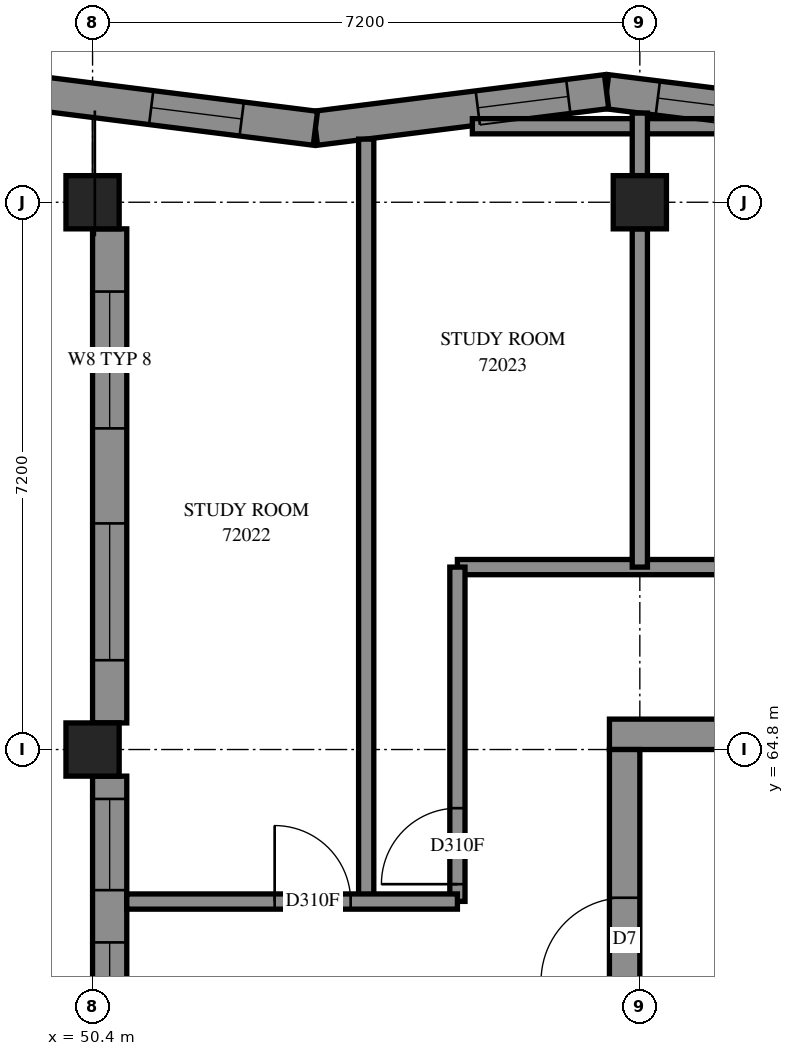
"""IFC4 building model, lengths in metres.
Left out: names, types, materials, properties, quantities, classifications, styles, units other than length and angle.
Written with IfcOpenShell. Run it as: python <this file> out.ifc"""

import sys

from ifc_helpers import new_model, si_unit, direction, frame, frame_2d, origin, origin_2d, place, context, subcontext, project, spatial, polyline, rectangle, outline, extrude, element, fill, save


model = new_model("IFC4")
c1 = context("Model", 3, precision=1e-05, world=origin(), true_north=direction((0.0, 1.0)))
c2 = subcontext(c1, "Body", "Model", "MODEL_VIEW")
j1 = project(units=[si_unit("LENGTHUNIT", "METRE"), si_unit("PLANEANGLEUNIT", "RADIAN")], contexts=[c1])
p1 = place(None, origin())
s1 = spatial("IfcSite", under=j1, at=p1, CompositionType="ELEMENT")
p2 = place(p1, origin())
s2 = spatial("IfcBuilding", under=s1, at=p2, CompositionType="ELEMENT")
p3 = place(p2, frame((0.0, 0.0, 264.2)))
s3 = spatial("IfcBuildingStorey", under=s2, at=p3, CompositionType="ELEMENT", Elevation=264.2)
for number, where, z_axis, x_axis in (
    (1, (50.4, 64.8, 0.0), (0.0, 0.0, 1.0), (1.0, 0.0, 0.0)),
    (2, (50.4, 72.0, 0.0), (0.0, 0.0, 1.0), (1.0, 0.0, 0.0)),
    (3, (57.6, 72.0, 0.0), (0.0, 0.0, 1.0), (1.0, 0.0, 0.0)),
):
    element("IfcColumn", number, at=place(p3, frame(where, z_axis=z_axis, x_axis=x_axis)), inside=s3, PredefinedType="COLUMN", context=c2, shape_type="SweptSolid", body=[
        extrude(rectangle(XDim=0.7, YDim=0.7, at=origin_2d()), origin(), (0.0, 0.0, 1.0), 3.1),
    ])
p4 = place(p3, frame((57.2, 65.0, -0.3), z_axis=(0.0, 0.0, 1.0), x_axis=(1.0, 0.0, 0.0)))
e4 = element("IfcWall", 4, at=p4, inside=s3, PredefinedType="SHEAR", context=c2, shape_type="SweptSolid", body=[
    extrude(rectangle(XDim=15.2, YDim=0.4, at=frame_2d((7.6, 0.0))), origin(), (0.0, 0.0, 1.0), 2.7),
])
p5 = place(p4, frame((10.4, 0.0, 0.3)))
e5 = element("IfcOpeningElement", 5, at=p5, cuts=e4, PredefinedType="OPENING", context=c2, shape_type="SweptSolid", body=[
    extrude(rectangle(XDim=0.8, YDim=2.1, at=frame_2d((0.4, 1.05))), frame((0.0, 0.21, 0.0), z_axis=(0.0, -1.0, 0.0), x_axis=(1.0, 0.0, 0.0)), (0.0, 0.0, 1.0), 0.42),
])
p6 = place(p3, frame((57.4, 50.4, -0.3), z_axis=(0.0, 0.0, 1.0), x_axis=(0.0, 1.0, 0.0)))
e6 = element("IfcWall", 6, at=p6, inside=s3, PredefinedType="SHEAR", context=c2, shape_type="SweptSolid", body=[
    extrude(rectangle(XDim=14.4, YDim=0.4, at=frame_2d((7.2, 0.0))), origin(), (0.0, 0.0, 1.0), 2.7),
])
p7 = place(p6, frame((4.55, 0.0, 0.3)))
e7 = element("IfcOpeningElement", 7, at=p7, cuts=e6, PredefinedType="OPENING", context=c2, shape_type="SweptSolid", body=[
    extrude(rectangle(XDim=1.1, YDim=2.1, at=frame_2d((0.55, 1.05))), frame((0.0, 0.21, 0.0), z_axis=(0.0, -1.0, 0.0), x_axis=(1.0, 0.0, 0.0)), (0.0, 0.0, 1.0), 0.42),
])
p8 = place(p6, frame((11.35, 0.0, 0.3)))
e8 = element("IfcOpeningElement", 8, at=p8, cuts=e6, PredefinedType="OPENING", context=c2, shape_type="SweptSolid", body=[
    extrude(rectangle(XDim=1.1, YDim=2.1, at=frame_2d((0.55, 1.05))), frame((0.0, 0.21, 0.0), z_axis=(0.0, -1.0, 0.0), x_axis=(1.0, 0.0, 0.0)), (0.0, 0.0, 1.0), 0.42),
])
p9 = place(p3, frame((60.993, 72.973, 0.0), z_axis=(0.0, 0.0, 1.0), x_axis=(-0.9921759282, 0.1248476171, 0.0)))
e9 = element("IfcWall", 9, at=p9, inside=s3, PredefinedType="SOLIDWALL", context=c2, shape_type="SweptSolid", body=[
    extrude(outline(polyline([(0.028, -0.225), (3.889, -0.225), (3.832, 0.225), (-0.028, 0.225), (0.028, -0.225)])), origin(), (0.0, 0.0, 1.0), 3.1),
])
p10 = place(p9, frame((0.531, 0.0, 0.45)))
e10 = element("IfcOpeningElement", 10, at=p10, cuts=e9, PredefinedType="OPENING", context=c2, shape_type="SweptSolid", body=[
    extrude(rectangle(XDim=1.3, YDim=2.5, at=frame_2d((0.65, 1.25))), frame((0.0, 0.235, 0.0), z_axis=(0.0, -1.0, 0.0), x_axis=(1.0, 0.0, 0.0)), (0.0, 0.0, 1.0), 0.47),
])
p11 = place(p9, frame((2.181, 0.0, 0.45)))
e11 = element("IfcOpeningElement", 11, at=p11, cuts=e9, PredefinedType="OPENING", context=c2, shape_type="SweptSolid", body=[
    extrude(rectangle(XDim=1.0, YDim=2.5, at=frame_2d((0.5, 1.25))), frame((0.0, 0.235, 0.0), z_axis=(0.0, -1.0, 0.0), x_axis=(1.0, 0.0, 0.0)), (0.0, 0.0, 1.0), 0.47),
])
p12 = place(p3, frame((57.162, 73.455, 0.0), z_axis=(0.0, 0.0, 1.0), x_axis=(-0.9921763319, -0.1248444087, 0.0)))
e12 = element("IfcWall", 12, at=p12, inside=s3, PredefinedType="SOLIDWALL", context=c2, shape_type="SweptSolid", body=[
    extrude(outline(polyline([(-0.028, -0.225), (3.832, -0.225), (3.889, 0.225), (0.028, 0.225), (-0.028, -0.225)])), origin(), (0.0, 0.0, 1.0), 3.1),
])
p13 = place(p12, frame((0.508, 0.0, 0.45)))
e13 = element("IfcOpeningElement", 13, at=p13, cuts=e12, PredefinedType="OPENING", context=c2, shape_type="SweptSolid", body=[
    extrude(rectangle(XDim=1.2, YDim=2.55, at=frame_2d((0.6, 1.275))), frame((0.0, 0.235, 0.0), z_axis=(0.0, -1.0, 0.0), x_axis=(1.0, 0.0, 0.0)), (0.0, 0.0, 1.0), 0.47),
])
p14 = place(p3, frame((53.332, 72.973, 0.0), z_axis=(0.0, 0.0, 1.0), x_axis=(-0.9921759282, 0.1248476171, 0.0)))
e14 = element("IfcWall", 14, at=p14, inside=s3, PredefinedType="SOLIDWALL", context=c2, shape_type="SweptSolid", body=[
    extrude(outline(polyline([(0.028, -0.225), (3.889, -0.225), (3.832, 0.225), (-0.028, 0.225), (0.028, -0.225)])), origin(), (0.0, 0.0, 1.0), 3.1),
])
p15 = place(p14, frame((0.977, 0.0, 0.45)))
e15 = element("IfcOpeningElement", 15, at=p15, cuts=e14, PredefinedType="OPENING", context=c2, shape_type="SweptSolid", body=[
    extrude(rectangle(XDim=1.2, YDim=2.55, at=frame_2d((0.6, 1.275))), frame((0.0, 0.235, 0.0), z_axis=(0.0, -1.0, 0.0), x_axis=(1.0, 0.0, 0.0)), (0.0, 0.0, 1.0), 0.47),
])
p16 = place(p3, frame((50.625, 71.65, 0.0), z_axis=(0.0, 0.0, 1.0), x_axis=(0.0, -1.0, 0.0)))
e16 = element("IfcWall", 16, at=p16, inside=s3, PredefinedType="SOLIDWALL", context=c2, shape_type="SweptSolid", body=[
    extrude(rectangle(XDim=6.5, YDim=0.45, at=frame_2d((3.25, 0.0))), origin(), (0.0, 0.0, 1.0), 3.1),
])
p17 = place(p16, frame((0.825, 0.0, 0.7)))
e17 = element("IfcOpeningElement", 17, at=p17, cuts=e16, PredefinedType="OPENING", context=c2, shape_type="SweptSolid", body=[
    extrude(rectangle(XDim=1.8, YDim=1.8, at=frame_2d((0.9, 0.9))), frame((0.0, 0.235, 0.0), z_axis=(0.0, -1.0, 0.0), x_axis=(1.0, 0.0, 0.0)), (0.0, 0.0, 1.0), 0.47),
])
p18 = place(p16, frame((3.875, 0.0, 0.7)))
e18 = element("IfcOpeningElement", 18, at=p18, cuts=e16, PredefinedType="OPENING", context=c2, shape_type="SweptSolid", body=[
    extrude(rectangle(XDim=1.8, YDim=1.8, at=frame_2d((0.9, 0.9))), frame((0.0, 0.235, 0.0), z_axis=(0.0, -1.0, 0.0), x_axis=(1.0, 0.0, 0.0)), (0.0, 0.0, 1.0), 0.47),
])
p19 = place(p3, frame((50.625, 64.45, 0.0), z_axis=(0.0, 0.0, 1.0), x_axis=(0.0, -1.0, 0.0)))
e19 = element("IfcWall", 19, at=p19, inside=s3, PredefinedType="SOLIDWALL", context=c2, shape_type="SweptSolid", body=[
    extrude(rectangle(XDim=6.5, YDim=0.45, at=frame_2d((3.25, 0.0))), origin(), (0.0, 0.0, 1.0), 3.1),
])
p20 = place(p19, frame((3.875, 0.0, 0.7)))
e20 = element("IfcOpeningElement", 20, at=p20, cuts=e19, PredefinedType="OPENING", context=c2, shape_type="SweptSolid", body=[
    extrude(rectangle(XDim=1.8, YDim=1.8, at=frame_2d((0.9, 0.9))), frame((0.0, 0.235, 0.0), z_axis=(0.0, -1.0, 0.0), x_axis=(1.0, 0.0, 0.0)), (0.0, 0.0, 1.0), 0.47),
])
p21 = place(p19, frame((0.3, 0.0, 0.6)))
e21 = element("IfcOpeningElement", 21, at=p21, cuts=e19, PredefinedType="OPENING", context=c2, shape_type="SweptSolid", body=[
    extrude(rectangle(XDim=1.2, YDim=1.9, at=frame_2d((0.6, 0.95))), frame((0.0, 0.235, 0.0), z_axis=(0.0, -1.0, 0.0), x_axis=(1.0, 0.0, 0.0)), (0.0, 0.0, 1.0), 0.47),
])
p22 = place(p19, frame((2.188, 0.0, 0.6)))
e22 = element("IfcOpeningElement", 22, at=p22, cuts=e19, PredefinedType="OPENING", context=c2, shape_type="SweptSolid", body=[
    extrude(rectangle(XDim=1.2, YDim=1.9, at=frame_2d((0.6, 0.95))), frame((0.0, 0.235, 0.0), z_axis=(0.0, -1.0, 0.0), x_axis=(1.0, 0.0, 0.0)), (0.0, 0.0, 1.0), 0.47),
])
p23 = place(p3, frame((55.2, 67.2, 0.0), z_axis=(0.0, 0.0, 1.0), x_axis=(1.0, 0.0, 0.0)))
e23 = element("IfcWall", 23, at=p23, inside=s3, PredefinedType="PARTITIONING", context=c2, shape_type="SweptSolid", body=[
    extrude(rectangle(XDim=19.2, YDim=0.2, at=frame_2d((9.6, 0.0))), origin(), (0.0, 0.0, 1.0), 3.1),
])
p24 = place(p23, frame((4.492, 0.0, 0.0)))
e24 = element("IfcOpeningElement", 24, at=p24, cuts=e23, PredefinedType="OPENING", context=c2, shape_type="SweptSolid", body=[
    extrude(rectangle(XDim=1.0, YDim=2.1, at=frame_2d((0.5, 1.05))), frame((0.0, 0.11, 0.0), z_axis=(0.0, -1.0, 0.0), x_axis=(1.0, 0.0, 0.0)), (0.0, 0.0, 1.0), 0.22),
])
p25 = place(p23, frame((6.567, 0.0, 0.0)))
e25 = element("IfcOpeningElement", 25, at=p25, cuts=e23, PredefinedType="OPENING", context=c2, shape_type="SweptSolid", body=[
    extrude(rectangle(XDim=1.0, YDim=2.1, at=frame_2d((0.5, 1.05))), frame((0.0, 0.11, 0.0), z_axis=(0.0, -1.0, 0.0), x_axis=(1.0, 0.0, 0.0)), (0.0, 0.0, 1.0), 0.22),
])
p26 = place(p23, frame((11.693, 0.0, 0.0)))
e26 = element("IfcOpeningElement", 26, at=p26, cuts=e23, PredefinedType="OPENING", context=c2, shape_type="SweptSolid", body=[
    extrude(rectangle(XDim=1.0, YDim=2.1, at=frame_2d((0.5, 1.05))), frame((0.0, 0.11, 0.0), z_axis=(0.0, -1.0, 0.0), x_axis=(1.0, 0.0, 0.0)), (0.0, 0.0, 1.0), 0.22),
])
p27 = place(p23, frame((13.88, 0.0, 0.0)))
e27 = element("IfcOpeningElement", 27, at=p27, cuts=e23, PredefinedType="OPENING", context=c2, shape_type="SweptSolid", body=[
    extrude(rectangle(XDim=1.0, YDim=2.1, at=frame_2d((0.5, 1.05))), frame((0.0, 0.11, 0.0), z_axis=(0.0, -1.0, 0.0), x_axis=(1.0, 0.0, 0.0)), (0.0, 0.0, 1.0), 0.22),
])
p28 = place(p3, frame((54.0, 62.8, 0.0), z_axis=(0.0, 0.0, 1.0), x_axis=(0.0, 1.0, 0.0)))
e28 = element("IfcWall", 28, at=p28, inside=s3, PredefinedType="PARTITIONING", context=c2, shape_type="SweptSolid", body=[
    extrude(rectangle(XDim=10.031, YDim=0.2, at=frame_2d((5.015, 0.0))), origin(), (0.0, 0.0, 1.0), 3.1),
])
p29 = place(p3, frame((57.6, 67.2, 0.0), z_axis=(0.0, 0.0, 1.0), x_axis=(0.0, 1.0, 0.0)))
e29 = element("IfcWall", 29, at=p29, inside=s3, PredefinedType="PARTITIONING", context=c2, shape_type="SweptSolid", body=[
    extrude(rectangle(XDim=4.45, YDim=0.2, at=frame_2d((2.225, 0.0))), origin(), (0.0, 0.0, 1.0), 3.1),
])
p30 = place(p3, frame((55.2, 62.802, 0.0), z_axis=(0.0, 0.0, 1.0), x_axis=(0.0, 1.0, 0.0)))
e30 = element("IfcWall", 30, at=p30, inside=s3, PredefinedType="PARTITIONING", context=c2, shape_type="SweptSolid", body=[
    extrude(rectangle(XDim=4.398, YDim=0.2, at=frame_2d((2.199, 0.0))), origin(), (0.0, 0.0, 1.0), 3.1),
])
p31 = place(p30, frame((0.227, 0.0, 0.0)))
e31 = element("IfcOpeningElement", 31, at=p31, cuts=e30, PredefinedType="OPENING", context=c2, shape_type="SweptSolid", body=[
    extrude(rectangle(XDim=1.0, YDim=2.1, at=frame_2d((0.5, 1.05))), frame((0.0, 0.11, 0.0), z_axis=(0.0, -1.0, 0.0), x_axis=(1.0, 0.0, 0.0)), (0.0, 0.0, 1.0), 0.22),
])
p32 = place(p3, frame((50.85, 62.8, 0.0), z_axis=(0.0, 0.0, 1.0), x_axis=(1.0, 0.0, 0.0)))
e32 = element("IfcWall", 32, at=p32, inside=s3, PredefinedType="PARTITIONING", context=c2, shape_type="SweptSolid", body=[
    extrude(rectangle(XDim=4.35, YDim=0.2, at=frame_2d((2.175, 0.0))), origin(), (0.0, 0.0, 1.0), 3.1),
])
p33 = place(p32, frame((1.946, 0.0, 0.0)))
e33 = element("IfcOpeningElement", 33, at=p33, cuts=e32, PredefinedType="OPENING", context=c2, shape_type="SweptSolid", body=[
    extrude(rectangle(XDim=1.0, YDim=2.1, at=frame_2d((0.5, 1.05))), frame((0.0, 0.11, 0.0), z_axis=(0.0, -1.0, 0.0), x_axis=(1.0, 0.0, 0.0)), (0.0, 0.0, 1.0), 0.22),
])
p34 = place(p3, frame((55.397, 73.0, 0.0), z_axis=(0.0, 0.0, 1.0), x_axis=(1.0, 0.0, 0.0)))
e34 = element("IfcWall", 34, at=p34, inside=s3, PredefinedType="PARTITIONING", context=c2, shape_type="SweptSolid", body=[
    extrude(rectangle(XDim=3.531, YDim=0.2, at=frame_2d((1.766, 0.0))), origin(), (0.0, 0.0, 1.0), 3.1),
])
p35 = place(p3, frame((57.6, 72.35, 0.0), z_axis=(0.0, 0.0, 1.0), x_axis=(0.0, 1.0, 0.0)))
e35 = element("IfcWall", 35, at=p35, inside=s3, PredefinedType="PARTITIONING", context=c2, shape_type="SweptSolid", body=[
    extrude(rectangle(XDim=0.823, YDim=0.2, at=frame_2d((0.412, 0.0))), origin(), (0.0, 0.0, 1.0), 3.1),
])
p36 = place(p13, origin())
e36 = element("IfcWindow", 36, at=p36, inside=s3, PartitioningType="SINGLE_PANEL", PredefinedType="WINDOW", context=c2, shape_type="SweptSolid", body=[
    extrude(rectangle(XDim=1.2, YDim=2.55, at=frame_2d((0.6, 1.275))), frame((0.0, 0.105, 0.0), z_axis=(0.0, -1.0, 0.0), x_axis=(1.0, 0.0, 0.0)), (0.0, 0.0, 1.0), 0.06),
])
fill(e13, e36)
p37 = place(p15, origin())
e37 = element("IfcWindow", 37, at=p37, inside=s3, PartitioningType="SINGLE_PANEL", PredefinedType="WINDOW", context=c2, shape_type="SweptSolid", body=[
    extrude(rectangle(XDim=1.2, YDim=2.55, at=frame_2d((0.6, 1.275))), frame((0.0, 0.205, 0.0), z_axis=(0.0, -1.0, 0.0), x_axis=(1.0, 0.0, 0.0)), (0.0, 0.0, 1.0), 0.06),
])
fill(e15, e37)
p38 = place(p17, origin())
e38 = element("IfcWindow", 38, at=p38, inside=s3, PartitioningType="SINGLE_PANEL", PredefinedType="WINDOW", context=c2, shape_type="SweptSolid", body=[
    extrude(rectangle(XDim=1.8, YDim=1.8, at=frame_2d((0.9, 0.9))), frame((0.0, 0.205, 0.0), z_axis=(0.0, -1.0, 0.0), x_axis=(1.0, 0.0, 0.0)), (0.0, 0.0, 1.0), 0.06),
])
fill(e17, e38)
p39 = place(p18, origin())
e39 = element("IfcWindow", 39, at=p39, inside=s3, PartitioningType="SINGLE_PANEL", PredefinedType="WINDOW", context=c2, shape_type="SweptSolid", body=[
    extrude(rectangle(XDim=1.8, YDim=1.8, at=frame_2d((0.9, 0.9))), frame((0.0, 0.205, 0.0), z_axis=(0.0, -1.0, 0.0), x_axis=(1.0, 0.0, 0.0)), (0.0, 0.0, 1.0), 0.06),
])
fill(e18, e39)
p40 = place(p8, origin())
e40 = element("IfcDoor", 40, at=p40, inside=s3, OperationType="SINGLE_SWING_LEFT", PredefinedType="DOOR", context=c2, shape_type="SweptSolid", body=[
    extrude(rectangle(XDim=1.1, YDim=2.1, at=frame_2d((0.55, 1.05))), frame((0.0, 0.025, 0.0), z_axis=(0.0, -1.0, 0.0), x_axis=(1.0, 0.0, 0.0)), (0.0, 0.0, 1.0), 0.05),
])
fill(e8, e40)
p41 = place(p33, origin())
e41 = element("IfcDoor", 41, at=p41, inside=s3, OperationType="SINGLE_SWING_RIGHT", PredefinedType="DOOR", context=c2, shape_type="SweptSolid", body=[
    extrude(rectangle(XDim=1.0, YDim=2.1, at=frame_2d((0.5, 1.05))), frame((0.0, 0.025, 0.0), z_axis=(0.0, -1.0, 0.0), x_axis=(1.0, 0.0, 0.0)), (0.0, 0.0, 1.0), 0.05),
])
fill(e33, e41)
p42 = place(p31, origin())
e42 = element("IfcDoor", 42, at=p42, inside=s3, OperationType="SINGLE_SWING_LEFT", PredefinedType="DOOR", context=c2, shape_type="SweptSolid", body=[
    extrude(rectangle(XDim=1.0, YDim=2.1, at=frame_2d((0.5, 1.05))), frame((0.0, 0.025, 0.0), z_axis=(0.0, -1.0, 0.0), x_axis=(1.0, 0.0, 0.0)), (0.0, 0.0, 1.0), 0.05),
])
fill(e31, e42)
p43 = place(p11, origin())
e43 = element("IfcWindow", 43, at=p43, inside=s3, PartitioningType="SINGLE_PANEL", PredefinedType="WINDOW", context=c2, shape_type="SweptSolid", body=[
    extrude(rectangle(XDim=1.0, YDim=2.5, at=frame_2d((0.5, 1.25))), frame((0.0, 0.115, 0.0), z_axis=(0.0, -1.0, 0.0), x_axis=(1.0, 0.0, 0.0)), (0.0, 0.0, 1.0), 0.06),
])
fill(e11, e43)
p44 = place(p21, origin())
e44 = element("IfcWindow", 44, at=p44, inside=s3, PartitioningType="SINGLE_PANEL", PredefinedType="WINDOW", context=c2, shape_type="SweptSolid", body=[
    extrude(rectangle(XDim=1.2, YDim=1.9, at=frame_2d((0.6, 0.95))), frame((0.0, 0.205, 0.0), z_axis=(0.0, -1.0, 0.0), x_axis=(1.0, 0.0, 0.0)), (0.0, 0.0, 1.0), 0.06),
])
fill(e21, e44)
p45 = place(p22, origin())
e45 = element("IfcWindow", 45, at=p45, inside=s3, PartitioningType="SINGLE_PANEL", PredefinedType="WINDOW", context=c2, shape_type="SweptSolid", body=[
    extrude(rectangle(XDim=1.2, YDim=1.9, at=frame_2d((0.6, 0.95))), frame((0.0, 0.205, 0.0), z_axis=(0.0, -1.0, 0.0), x_axis=(1.0, 0.0, 0.0)), (0.0, 0.0, 1.0), 0.06),
])
fill(e22, e45)
save(model, sys.argv[1])
